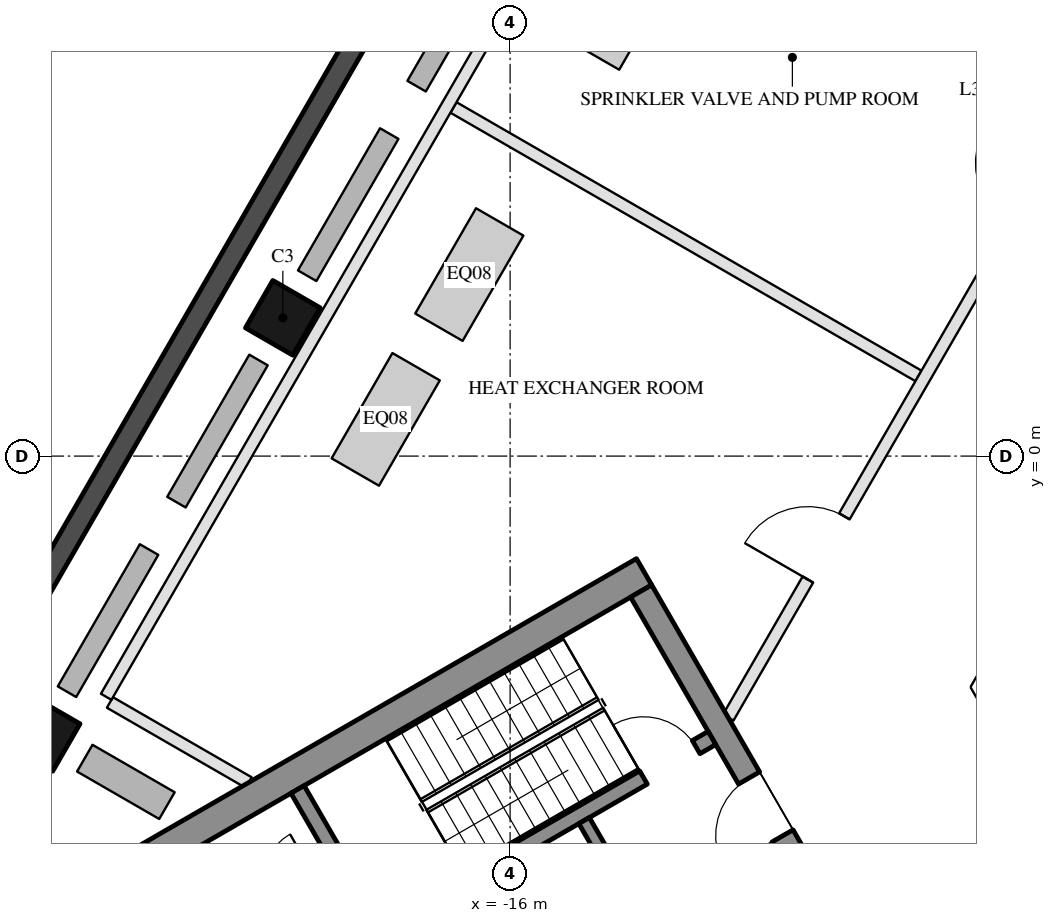
"""IFC4 building model, lengths in metres.
Left out: names, types, materials, properties, quantities, classifications, styles, units other than length and angle.
Written with IfcOpenShell. Run it as: python <this file> out.ifc"""

import sys

from ifc_helpers import new_model, si_unit, direction, frame, frame_2d, origin, origin_2d, place, context, subcontext, project, spatial, rectangle, hollow_rectangle, extrude, element, fill, save


model = new_model("IFC4")
c1 = context("Model", 3, precision=1e-05, world=origin(), true_north=direction((0.0, 1.0)))
c2 = subcontext(c1, "Body", "Model", "MODEL_VIEW")
j1 = project(units=[si_unit("LENGTHUNIT", "METRE"), si_unit("PLANEANGLEUNIT", "RADIAN")], contexts=[c1])
p1 = place(None, origin())
s1 = spatial("IfcSite", under=j1, at=p1, CompositionType="ELEMENT")
p2 = place(p1, origin())
s2 = spatial("IfcBuilding", under=s1, at=p2, CompositionType="ELEMENT")
p3 = place(p2, frame((0.0, 0.0, 137.6)))
s3 = spatial("IfcBuildingStorey", under=s2, at=p3, CompositionType="ELEMENT", Elevation=137.6)
for number, where, z_axis, x_axis in (
    (1, (-19.738, 2.273, 0.0), (0.0, 0.0, 1.0), (0.5, 0.866, 0.0)),
    (2, (-23.688, -4.568, 0.0), (0.0, 0.0, 1.0), (0.5, 0.866, 0.0)),
):
    element("IfcColumn", number, at=place(p3, frame(where, z_axis=z_axis, x_axis=x_axis)), inside=s3, PredefinedType="COLUMN", context=c2, shape_type="SweptSolid", body=[
        extrude(hollow_rectangle(XDim=0.9, YDim=0.9, WallThickness=0.04, at=origin_2d()), origin(), (0.0, 0.0, 1.0), 4.5),
    ])
p4 = place(p3, frame((-7.441, 26.022, 0.0), z_axis=(0.0, 0.0, 1.0), x_axis=(-0.499998380999, -0.866026338513, 0.0)))
e3 = element("IfcWall", 3, at=p4, inside=s3, PredefinedType="SOLIDWALL", context=c2, shape_type="SweptSolid", body=[
    extrude(rectangle(XDim=37.631, YDim=0.35, at=frame_2d((18.816, 0.0))), origin(), (0.0, 0.0, 1.0), 4.2),
])
p5 = place(p3, frame((-13.797, -1.903, 0.0), z_axis=(0.0, 0.0, 1.0), x_axis=(-0.866025009528, -0.500000682871, 0.0)))
e4 = element("IfcWall", 4, at=p5, inside=s3, PredefinedType="SHEAR", context=c2, shape_type="SweptSolid", body=[
    extrude(rectangle(XDim=14.837, YDim=0.5, at=frame_2d((7.418, 0.0))), origin(), (0.0, 0.0, 1.0), 4.2),
])
p6 = place(p3, frame((-13.845, -2.22, 0.0), z_axis=(0.0, 0.0, 1.0), x_axis=(0.500004234368, -0.866022959057, 0.0)))
e5 = element("IfcWall", 5, at=p6, inside=s3, PredefinedType="SHEAR", context=c2, shape_type="SweptSolid", body=[
    extrude(rectangle(XDim=10.0, YDim=0.4, at=frame_2d((5.0, 0.0))), origin(), (0.0, 0.0, 1.0), 4.2),
])
p7 = place(p6, frame((3.55, 0.0, 0.0)))
e6 = element("IfcOpeningElement", 6, at=p7, cuts=e5, PredefinedType="OPENING", context=c2, shape_type="SweptSolid", body=[
    extrude(rectangle(XDim=1.1, YDim=2.1, at=frame_2d((0.55, 1.05))), frame((0.0, 0.21, 0.0), z_axis=(0.0, -1.0, 0.0), x_axis=(1.0, 0.0, 0.0)), (0.0, 0.0, 1.0), 0.42),
])
p8 = place(p6, frame((5.85, 0.0, 0.0)))
e7 = element("IfcOpeningElement", 7, at=p8, cuts=e5, PredefinedType="OPENING", context=c2, shape_type="SweptSolid", body=[
    extrude(rectangle(XDim=1.4, YDim=2.1, at=frame_2d((0.7, 1.05))), frame((0.0, 0.21, 0.0), z_axis=(0.0, -1.0, 0.0), x_axis=(1.0, 0.0, 0.0)), (0.0, 0.0, 1.0), 0.42),
])
p9 = place(p3, frame((-12.681, -4.636, 0.0), z_axis=(0.0, 0.0, 1.0), x_axis=(-0.866021702275, -0.500006411147, 0.0)))
e8 = element("IfcWall", 8, at=p9, inside=s3, PredefinedType="SHEAR", context=c2, shape_type="SweptSolid", body=[
    extrude(rectangle(XDim=6.45, YDim=0.25, at=frame_2d((3.225, 0.0))), origin(), (0.0, 0.0, 1.0), 4.2),
])
p10 = place(p9, frame((0.3, 0.0, 0.0)))
e9 = element("IfcOpeningElement", 9, at=p10, cuts=e8, PredefinedType="OPENING", context=c2, shape_type="SweptSolid", body=[
    extrude(rectangle(XDim=1.0, YDim=2.1, at=frame_2d((0.5, 1.05))), frame((0.0, 0.135, 0.0), z_axis=(0.0, -1.0, 0.0), x_axis=(1.0, 0.0, 0.0)), (0.0, 0.0, 1.0), 0.27),
])
p11 = place(p3, frame((-19.496, -5.482, 0.0), z_axis=(0.0, 0.0, 1.0), x_axis=(0.499990435942, -0.866030925526, 0.0)))
e10 = element("IfcWall", 10, at=p11, inside=s3, PredefinedType="SHEAR", context=c2, shape_type="SweptSolid", body=[
    extrude(rectangle(XDim=2.55, YDim=0.25, at=frame_2d((1.275, 0.0))), origin(), (0.0, 0.0, 1.0), 4.2),
])
p12 = place(p3, frame((-14.783, -5.995, 0.0), z_axis=(0.0, 0.0, 1.0), x_axis=(0.49994636267, -0.866056369097, 0.0)))
e11 = element("IfcWall", 11, at=p12, inside=s3, PredefinedType="SHEAR", context=c2, shape_type="SweptSolid", body=[
    extrude(rectangle(XDim=2.8, YDim=0.2, at=frame_2d((1.4, 0.0))), origin(), (0.0, 0.0, 1.0), 4.2),
])
p13 = place(p12, frame((0.7, 0.0, 0.0)))
e12 = element("IfcOpeningElement", 12, at=p13, cuts=e11, PredefinedType="OPENING", context=c2, shape_type="SweptSolid", body=[
    extrude(rectangle(XDim=1.2, YDim=2.1, at=frame_2d((0.6, 1.05))), frame((0.0, 0.11, 0.0), z_axis=(0.0, -1.0, 0.0), x_axis=(1.0, 0.0, 0.0)), (0.0, 0.0, 1.0), 0.22),
])
p14 = place(p3, frame((-21.076, -6.395, 0.0), z_axis=(0.0, 0.0, 1.0), x_axis=(0.50001468107, -0.866016927499, 0.0)))
e13 = element("IfcWall", 13, at=p14, inside=s3, PredefinedType="PARTITIONING", context=c2, shape_type="SweptSolid", body=[
    extrude(rectangle(XDim=5.4, YDim=0.2, at=frame_2d((2.7, 0.0))), origin(), (0.0, 0.0, 1.0), 4.2),
])
p15 = place(p14, frame((3.05, 0.0, 0.0)))
e14 = element("IfcOpeningElement", 14, at=p15, cuts=e13, PredefinedType="OPENING", context=c2, shape_type="SweptSolid", body=[
    extrude(rectangle(XDim=0.9, YDim=2.1, at=frame_2d((0.45, 1.05))), frame((0.0, 0.11, 0.0), z_axis=(0.0, -1.0, 0.0), x_axis=(1.0, 0.0, 0.0)), (0.0, 0.0, 1.0), 0.22),
])
p16 = place(p3, frame((-16.931, 5.734, 0.0), z_axis=(0.0, 0.0, 1.0), x_axis=(0.866022591837, -0.500004870404, 0.0)))
e15 = element("IfcWall", 15, at=p16, inside=s3, PredefinedType="PARTITIONING", context=c2, shape_type="SweptSolid", body=[
    extrude(rectangle(XDim=8.83, YDim=0.2, at=frame_2d((4.415, 0.0))), origin(), (0.0, 0.0, 1.0), 4.2),
])
p17 = place(p3, frame((-22.581, -4.052, 0.0), z_axis=(0.0, 0.0, 1.0), x_axis=(0.866038977738, -0.499976488486, 0.0)))
e16 = element("IfcWall", 16, at=p17, inside=s3, PredefinedType="PARTITIONING", context=c2, shape_type="SweptSolid", body=[
    extrude(rectangle(XDim=2.635, YDim=0.2, at=frame_2d((1.317, 0.0))), origin(), (0.0, 0.0, 1.0), 4.2),
])
p18 = place(p3, frame((-7.893, 21.589, 0.0), z_axis=(0.0, 0.0, 1.0), x_axis=(-0.499998500593, -0.866026269466, 0.0)))
e17 = element("IfcWall", 17, at=p18, inside=s3, PredefinedType="PARTITIONING", context=c2, shape_type="SweptSolid", body=[
    extrude(rectangle(XDim=29.5, YDim=0.2, at=frame_2d((14.75, 0.0))), origin(), (0.0, 0.0, 1.0), 3.41),
])
p19 = place(p3, frame((-2.482, 12.9, 0.0), z_axis=(0.0, 0.0, 1.0), x_axis=(-0.50000478328, -0.866022642139, 0.0)))
e18 = element("IfcWall", 18, at=p19, inside=s3, PredefinedType="PARTITIONING", context=c2, shape_type="SweptSolid", body=[
    extrude(rectangle(XDim=19.861, YDim=0.2, at=frame_2d((9.931, 0.0))), origin(), (0.0, 0.0, 1.0), 3.41),
])
p20 = place(p19, frame((2.621, 0.0, 0.0)))
e19 = element("IfcOpeningElement", 19, at=p20, cuts=e18, PredefinedType="OPENING", context=c2, shape_type="SweptSolid", body=[
    extrude(rectangle(XDim=1.2, YDim=2.1, at=frame_2d((0.6, 1.05))), frame((0.0, 0.11, 0.0), z_axis=(0.0, -1.0, 0.0), x_axis=(1.0, 0.0, 0.0)), (0.0, 0.0, 1.0), 0.22),
])
p21 = place(p19, frame((9.331, 0.0, 0.0)))
e20 = element("IfcOpeningElement", 20, at=p21, cuts=e18, PredefinedType="OPENING", context=c2, shape_type="SweptSolid", body=[
    extrude(rectangle(XDim=1.2, YDim=2.1, at=frame_2d((0.6, 1.05))), frame((0.0, 0.11, 0.0), z_axis=(0.0, -1.0, 0.0), x_axis=(1.0, 0.0, 0.0)), (0.0, 0.0, 1.0), 0.22),
])
p22 = place(p19, frame((16.04, 0.0, 0.0)))
e21 = element("IfcOpeningElement", 21, at=p22, cuts=e18, PredefinedType="OPENING", context=c2, shape_type="SweptSolid", body=[
    extrude(rectangle(XDim=1.2, YDim=2.1, at=frame_2d((0.6, 1.05))), frame((0.0, 0.11, 0.0), z_axis=(0.0, -1.0, 0.0), x_axis=(1.0, 0.0, 0.0)), (0.0, 0.0, 1.0), 0.22),
])
p23 = place(p7, frame((1.1, 0.0, 0.0), z_axis=(0.0, 0.0, 1.0), x_axis=(-1.0, 0.0, 0.0)))
e22 = element("IfcDoor", 22, at=p23, inside=s3, OperationType="SINGLE_SWING_LEFT", PredefinedType="DOOR", context=c2, shape_type="SweptSolid", body=[
    extrude(rectangle(XDim=1.1, YDim=2.1, at=frame_2d((0.55, 1.05))), frame((0.0, 0.025, 0.0), z_axis=(0.0, -1.0, 0.0), x_axis=(1.0, 0.0, 0.0)), (0.0, 0.0, 1.0), 0.05),
])
fill(e6, e22)
p24 = place(p10, frame((1.0, 0.0, 0.0), z_axis=(0.0, 0.0, 1.0), x_axis=(-1.0, 0.0, 0.0)))
e23 = element("IfcDoor", 23, at=p24, inside=s3, OperationType="SINGLE_SWING_LEFT", PredefinedType="DOOR", context=c2, shape_type="SweptSolid", body=[
    extrude(rectangle(XDim=1.0, YDim=2.1, at=frame_2d((0.5, 1.05))), frame((0.0, 0.025, 0.0), z_axis=(0.0, -1.0, 0.0), x_axis=(1.0, 0.0, 0.0)), (0.0, 0.0, 1.0), 0.05),
])
fill(e9, e23)
p25 = place(p22, frame((1.2, 0.0, 0.0), z_axis=(0.0, 0.0, 1.0), x_axis=(-1.0, 0.0, 0.0)))
e24 = element("IfcDoor", 24, at=p25, inside=s3, OperationType="SINGLE_SWING_LEFT", PredefinedType="DOOR", context=c2, shape_type="SweptSolid", body=[
    extrude(rectangle(XDim=1.2, YDim=2.1, at=frame_2d((0.6, 1.05))), frame((0.0, 0.025, 0.0), z_axis=(0.0, -1.0, 0.0), x_axis=(1.0, 0.0, 0.0)), (0.0, 0.0, 1.0), 0.05),
])
fill(e21, e24)
save(model, sys.argv[1])
